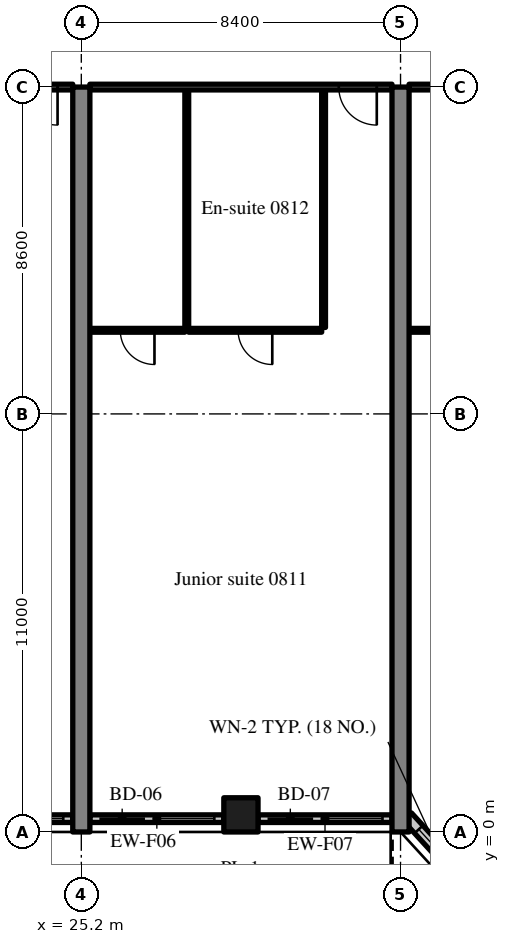
"""IFC4 building model, lengths in metres.
Left out: names, types, materials, properties, quantities, classifications, styles, units other than length and angle.
Written with IfcOpenShell. Run it as: python <this file> out.ifc"""

import sys

from ifc_helpers import new_model, si_unit, direction, frame, frame_2d, origin, origin_2d, place, context, subcontext, project, spatial, rectangle, extrude, source, transform, mapped, element, fill, save


model = new_model("IFC4")
c1 = context("Model", 3, precision=1e-05, world=origin(), true_north=direction((0.0, 1.0)))
c2 = subcontext(c1, "Body", "Model", "MODEL_VIEW")
j1 = project(units=[si_unit("LENGTHUNIT", "METRE"), si_unit("PLANEANGLEUNIT", "RADIAN")], contexts=[c1])
p1 = place(None, origin())
s1 = spatial("IfcSite", under=j1, at=p1, CompositionType="ELEMENT")
p2 = place(p1, origin())
s2 = spatial("IfcBuilding", under=s1, at=p2, CompositionType="ELEMENT")
p3 = place(p2, frame((0.0, 0.0, 39.2)))
s3 = spatial("IfcBuildingStorey", under=s2, at=p3, CompositionType="ELEMENT", Elevation=39.2)
m1 = source(origin(), c2, "Body", "SweptSolid", [
    extrude(rectangle(XDim=19.6, YDim=0.45, at=frame_2d((9.8, 0.0))), origin(), (0.0, 0.0, 1.0), 3.52),
])
for number, where, z_axis, x_axis in (
    (1, (25.2, 0.0, 0.0), (0.0, 0.0, 1.0), (0.0, 1.0, 0.0)),
    (2, (33.6, 0.0, 0.0), (0.0, 0.0, 1.0), (0.0, 1.0, 0.0)),
):
    element("IfcWall", number, at=place(p3, frame(where, z_axis=z_axis, x_axis=x_axis)), inside=s3, PredefinedType="SHEAR", context=c2, shape_type="MappedRepresentation", body=[
        mapped(m1, transform((0.0, 0.0, 0.0), scale=1.0)),
    ])
m2 = source(origin(), c2, "Body", "SweptSolid", [
    extrude(rectangle(XDim=0.9, YDim=0.9, at=origin_2d()), origin(), (0.0, 0.0, 1.0), 3.52),
])
p4 = place(p3, frame((29.4, 0.45, 0.0), z_axis=(0.0, 0.0, 1.0), x_axis=(1.0, 0.0, 0.0)))
e3 = element("IfcColumn", 3, at=p4, inside=s3, PredefinedType="COLUMN", context=c2, shape_type="MappedRepresentation", body=[
    mapped(m2, transform((0.0, 0.0, 0.0), scale=1.0)),
])
m3 = source(origin(), c2, "Body", "SweptSolid", [
    extrude(rectangle(XDim=3.525, YDim=0.2, at=frame_2d((1.763, 0.0))), origin(), (0.0, 0.0, 1.0), 2.77),
])
p5 = place(p3, frame((21.45, 0.35, 0.0), z_axis=(0.0, 0.0, 1.0), x_axis=(1.0, 0.0, 0.0)))
e4 = element("IfcWall", 4, at=p5, inside=s3, PredefinedType="SOLIDWALL", context=c2, shape_type="MappedRepresentation", body=[
    mapped(m3, transform((0.0, 0.0, 0.0), scale=1.0)),
])
m4 = source(origin(), c2, "Body", "SweptSolid", [
    extrude(rectangle(XDim=1.2, YDim=2.4, at=frame_2d((0.6, 1.2))), frame((0.0, 0.11, 0.0), z_axis=(0.0, -1.0, 0.0), x_axis=(1.0, 0.0, 0.0)), (0.0, 0.0, 1.0), 0.22),
])
p6 = place(p5, frame((0.25, 0.0, 0.0)))
e5 = element("IfcOpeningElement", 5, at=p6, cuts=e4, PredefinedType="OPENING", context=c2, shape_type="MappedRepresentation", body=[
    mapped(m4, transform((0.0, 0.0, 0.0), scale=1.0)),
])
m5 = source(origin(), c2, "Body", "SweptSolid", [
    extrude(rectangle(XDim=1.5, YDim=1.5, at=frame_2d((0.75, 0.75))), frame((0.0, 0.11, 0.0), z_axis=(0.0, -1.0, 0.0), x_axis=(1.0, 0.0, 0.0)), (0.0, 0.0, 1.0), 0.22),
])
p7 = place(p5, frame((1.775, 0.0, 0.9)))
e6 = element("IfcOpeningElement", 6, at=p7, cuts=e4, PredefinedType="OPENING", context=c2, shape_type="MappedRepresentation", body=[
    mapped(m5, transform((0.0, 0.0, 0.0), scale=1.0)),
])
m6 = source(origin(), c2, "Body", "SweptSolid", [
    extrude(rectangle(XDim=3.525, YDim=0.2, at=frame_2d((1.762, 0.0))), origin(), (0.0, 0.0, 1.0), 2.77),
])
p8 = place(p3, frame((25.425, 0.35, 0.0), z_axis=(0.0, 0.0, 1.0), x_axis=(1.0, 0.0, 0.0)))
e7 = element("IfcWall", 7, at=p8, inside=s3, PredefinedType="SOLIDWALL", context=c2, shape_type="MappedRepresentation", body=[
    mapped(m6, transform((0.0, 0.0, 0.0), scale=1.0)),
])
p9 = place(p8, frame((0.25, 0.0, 0.0)))
e8 = element("IfcOpeningElement", 8, at=p9, cuts=e7, PredefinedType="OPENING", context=c2, shape_type="MappedRepresentation", body=[
    mapped(m4, transform((0.0, 0.0, 0.0), scale=1.0)),
])
p10 = place(p8, frame((1.775, 0.0, 0.9)))
e9 = element("IfcOpeningElement", 9, at=p10, cuts=e7, PredefinedType="OPENING", context=c2, shape_type="MappedRepresentation", body=[
    mapped(m5, transform((0.0, 0.0, 0.0), scale=1.0)),
])
p11 = place(p3, frame((29.85, 0.35, 0.0), z_axis=(0.0, 0.0, 1.0), x_axis=(1.0, 0.0, 0.0)))
e10 = element("IfcWall", 10, at=p11, inside=s3, PredefinedType="SOLIDWALL", context=c2, shape_type="MappedRepresentation", body=[
    mapped(m6, transform((0.0, 0.0, 0.0), scale=1.0)),
])
p12 = place(p11, frame((0.25, 0.0, 0.0)))
e11 = element("IfcOpeningElement", 11, at=p12, cuts=e10, PredefinedType="OPENING", context=c2, shape_type="MappedRepresentation", body=[
    mapped(m4, transform((0.0, 0.0, 0.0), scale=1.0)),
])
p13 = place(p11, frame((1.775, 0.0, 0.9)))
e12 = element("IfcOpeningElement", 12, at=p13, cuts=e10, PredefinedType="OPENING", context=c2, shape_type="MappedRepresentation", body=[
    mapped(m5, transform((0.0, 0.0, 0.0), scale=1.0)),
])
m7 = source(origin(), c2, "Body", "SweptSolid", [
    extrude(rectangle(XDim=2.398, YDim=0.3, at=frame_2d((1.199, 0.0))), origin(), (0.0, 0.0, 1.0), 3.52),
])
p14 = place(p3, frame((33.776, 0.4, 0.0), z_axis=(0.0, 0.0, 1.0), x_axis=(0.675374189419, -0.737475222815, 0.0)))
e13 = element("IfcWall", 13, at=p14, inside=s3, PredefinedType="SOLIDWALL", context=c2, shape_type="MappedRepresentation", body=[
    mapped(m7, transform((0.0, 0.0, 0.0), scale=1.0)),
])
m8 = source(origin(), c2, "Body", "SweptSolid", [
    extrude(rectangle(XDim=1.5, YDim=2.0, at=frame_2d((0.75, 1.0))), frame((0.0, 0.16, 0.0), z_axis=(0.0, -1.0, 0.0), x_axis=(1.0, 0.0, 0.0)), (0.0, 0.0, 1.0), 0.32),
])
p15 = place(p14, frame((0.449, 0.0, 0.9)))
e14 = element("IfcOpeningElement", 14, at=p15, cuts=e13, PredefinedType="OPENING", context=c2, shape_type="MappedRepresentation", body=[
    mapped(m8, transform((0.0, 0.0, 0.0), scale=1.0)),
])
m9 = source(origin(), c2, "Body", "SweptSolid", [
    extrude(rectangle(XDim=7.95, YDim=0.15, at=frame_2d((3.975, 0.0))), origin(), (0.0, 0.0, 1.0), 2.82),
])
p16 = place(p3, frame((17.025, 19.6, 0.0), z_axis=(0.0, 0.0, 1.0), x_axis=(1.0, 0.0, 0.0)))
e15 = element("IfcWall", 15, at=p16, inside=s3, PredefinedType="PARTITIONING", context=c2, shape_type="MappedRepresentation", body=[
    mapped(m9, transform((0.0, 0.0, 0.0), scale=1.0)),
])
m10 = source(origin(), c2, "Body", "SweptSolid", [
    extrude(rectangle(XDim=1.0, YDim=2.1, at=frame_2d((0.5, 1.05))), frame((0.0, 0.085, 0.0), z_axis=(0.0, -1.0, 0.0), x_axis=(1.0, 0.0, 0.0)), (0.0, 0.0, 1.0), 0.17),
])
p17 = place(p16, frame((6.55, 0.0, 0.0)))
e16 = element("IfcOpeningElement", 16, at=p17, cuts=e15, PredefinedType="OPENING", context=c2, shape_type="MappedRepresentation", body=[
    mapped(m10, transform((0.0, 0.0, 0.0), scale=1.0)),
])
m11 = source(origin(), c2, "Body", "SweptSolid", [
    extrude(rectangle(XDim=6.25, YDim=0.1, at=frame_2d((3.125, 0.0))), origin(), (0.0, 0.0, 1.0), 3.52),
])
for number, where, z_axis, x_axis in (
    (17, (31.575, 13.275, 0.0), (0.0, 0.0, 1.0), (0.0, 1.0, 0.0)),
    (18, (27.975, 13.275, 0.0), (0.0, 0.0, 1.0), (0.0, 1.0, 0.0)),
):
    element("IfcWall", number, at=place(p3, frame(where, z_axis=z_axis, x_axis=x_axis)), inside=s3, PredefinedType="PARTITIONING", context=c2, shape_type="MappedRepresentation", body=[
        mapped(m11, transform((0.0, 0.0, 0.0), scale=1.0)),
    ])
m12 = source(origin(), c2, "Body", "SweptSolid", [
    extrude(rectangle(XDim=3.5, YDim=0.1, at=frame_2d((1.75, 0.0))), origin(), (0.0, 0.0, 1.0), 3.52),
])
p18 = place(p3, frame((28.025, 13.2, 0.0), z_axis=(0.0, 0.0, 1.0), x_axis=(1.0, 0.0, 0.0)))
e19 = element("IfcWall", 19, at=p18, inside=s3, PredefinedType="PARTITIONING", context=c2, shape_type="MappedRepresentation", body=[
    mapped(m12, transform((0.0, 0.0, 0.0), scale=1.0)),
])
m13 = source(origin(), c2, "Body", "SweptSolid", [
    extrude(rectangle(XDim=0.9, YDim=2.1, at=frame_2d((0.45, 1.05))), frame((0.0, 0.06, 0.0), z_axis=(0.0, -1.0, 0.0), x_axis=(1.0, 0.0, 0.0)), (0.0, 0.0, 1.0), 0.12),
])
p19 = place(p18, frame((1.3, 0.0, 0.0)))
e20 = element("IfcOpeningElement", 20, at=p19, cuts=e19, PredefinedType="OPENING", context=c2, shape_type="MappedRepresentation", body=[
    mapped(m13, transform((0.0, 0.0, 0.0), scale=1.0)),
])
m14 = source(origin(), c2, "Body", "SweptSolid", [
    extrude(rectangle(XDim=2.5, YDim=0.1, at=frame_2d((1.25, 0.0))), origin(), (0.0, 0.0, 1.0), 3.52),
])
p20 = place(p3, frame((25.425, 13.2, 0.0), z_axis=(0.0, 0.0, 1.0), x_axis=(1.0, 0.0, 0.0)))
e21 = element("IfcWall", 21, at=p20, inside=s3, PredefinedType="PARTITIONING", context=c2, shape_type="MappedRepresentation", body=[
    mapped(m14, transform((0.0, 0.0, 0.0), scale=1.0)),
])
p21 = place(p20, frame((0.8, 0.0, 0.0)))
e22 = element("IfcOpeningElement", 22, at=p21, cuts=e21, PredefinedType="OPENING", context=c2, shape_type="MappedRepresentation", body=[
    mapped(m13, transform((0.0, 0.0, 0.0), scale=1.0)),
])
m15 = source(origin(), c2, "Body", "SweptSolid", [
    extrude(rectangle(XDim=7.95, YDim=0.15, at=frame_2d((3.975, 0.0))), origin(), (0.0, 0.0, 1.0), 2.82),
])
p22 = place(p3, frame((25.425, 19.6, 0.0), z_axis=(0.0, 0.0, 1.0), x_axis=(1.0, 0.0, 0.0)))
e23 = element("IfcWall", 23, at=p22, inside=s3, PredefinedType="PARTITIONING", context=c2, shape_type="MappedRepresentation", body=[
    mapped(m15, transform((0.0, 0.0, 0.0), scale=1.0)),
])
p23 = place(p22, frame((6.55, 0.0, 0.0)))
e24 = element("IfcOpeningElement", 24, at=p23, cuts=e23, PredefinedType="OPENING", context=c2, shape_type="MappedRepresentation", body=[
    mapped(m10, transform((0.0, 0.0, 0.0), scale=1.0)),
])
p24 = place(p3, frame((33.825, 13.2, 0.0), z_axis=(0.0, 0.0, 1.0), x_axis=(1.0, 0.0, 0.0)))
e25 = element("IfcWall", 25, at=p24, inside=s3, PredefinedType="PARTITIONING", context=c2, shape_type="MappedRepresentation", body=[
    mapped(m14, transform((0.0, 0.0, 0.0), scale=1.0)),
])
p25 = place(p24, frame((0.8, 0.0, 0.0)))
e26 = element("IfcOpeningElement", 26, at=p25, cuts=e25, PredefinedType="OPENING", context=c2, shape_type="MappedRepresentation", body=[
    mapped(m13, transform((0.0, 0.0, 0.0), scale=1.0)),
])
p26 = place(p3, frame((33.825, 19.6, 0.0), z_axis=(0.0, 0.0, 1.0), x_axis=(1.0, 0.0, 0.0)))
e27 = element("IfcWall", 27, at=p26, inside=s3, PredefinedType="PARTITIONING", context=c2, shape_type="MappedRepresentation", body=[
    mapped(m15, transform((0.0, 0.0, 0.0), scale=1.0)),
])
p27 = place(p26, frame((6.55, 0.0, 0.0)))
e28 = element("IfcOpeningElement", 28, at=p27, cuts=e27, PredefinedType="OPENING", context=c2, shape_type="MappedRepresentation", body=[
    mapped(m10, transform((0.0, 0.0, 0.0), scale=1.0)),
])
m16 = source(origin(), c2, "Body", "SweptSolid", [
    extrude(rectangle(XDim=1.5, YDim=1.5, at=frame_2d((0.75, 0.75))), frame((0.0, 0.03, 0.0), z_axis=(0.0, -1.0, 0.0), x_axis=(1.0, 0.0, 0.0)), (0.0, 0.0, 1.0), 0.06),
])
p28 = place(p7, origin())
e29 = element("IfcWindow", 29, at=p28, inside=s3, PartitioningType="SINGLE_PANEL", PredefinedType="WINDOW", context=c2, shape_type="MappedRepresentation", body=[
    mapped(m16, transform((0.0, 0.0, 0.0), scale=1.0)),
])
fill(e6, e29)
m17 = source(origin(), c2, "Body", "SweptSolid", [
    extrude(rectangle(XDim=1.2, YDim=2.4, at=frame_2d((0.6, 1.2))), frame((0.0, 0.025, 0.0), z_axis=(0.0, -1.0, 0.0), x_axis=(1.0, 0.0, 0.0)), (0.0, 0.0, 1.0), 0.05),
])
p29 = place(p9, origin())
e30 = element("IfcDoor", 30, at=p29, inside=s3, OperationType="SLIDING_TO_RIGHT", PredefinedType="DOOR", context=c2, shape_type="MappedRepresentation", body=[
    mapped(m17, transform((0.0, 0.0, 0.0), scale=1.0)),
])
fill(e8, e30)
p30 = place(p10, origin())
e31 = element("IfcWindow", 31, at=p30, inside=s3, PartitioningType="SINGLE_PANEL", PredefinedType="WINDOW", context=c2, shape_type="MappedRepresentation", body=[
    mapped(m16, transform((0.0, 0.0, 0.0), scale=1.0)),
])
fill(e9, e31)
p31 = place(p12, origin())
e32 = element("IfcDoor", 32, at=p31, inside=s3, OperationType="SLIDING_TO_LEFT", PredefinedType="DOOR", context=c2, shape_type="MappedRepresentation", body=[
    mapped(m17, transform((0.0, 0.0, 0.0), scale=1.0)),
])
fill(e11, e32)
p32 = place(p13, origin())
e33 = element("IfcWindow", 33, at=p32, inside=s3, PartitioningType="SINGLE_PANEL", PredefinedType="WINDOW", context=c2, shape_type="MappedRepresentation", body=[
    mapped(m16, transform((0.0, 0.0, 0.0), scale=1.0)),
])
fill(e12, e33)
m18 = source(origin(), c2, "Body", "SweptSolid", [
    extrude(rectangle(XDim=1.5, YDim=2.0, at=frame_2d((0.75, 1.0))), frame((0.0, 0.03, 0.0), z_axis=(0.0, -1.0, 0.0), x_axis=(1.0, 0.0, 0.0)), (0.0, 0.0, 1.0), 0.06),
])
p33 = place(p15, origin())
e34 = element("IfcWindow", 34, at=p33, inside=s3, PartitioningType="SINGLE_PANEL", PredefinedType="WINDOW", context=c2, shape_type="MappedRepresentation", body=[
    mapped(m18, transform((0.0, 0.0, 0.0), scale=1.0)),
])
fill(e14, e34)
m19 = source(origin(), c2, "Body", "SweptSolid", [
    extrude(rectangle(XDim=1.0, YDim=2.1, at=frame_2d((0.5, 1.05))), frame((0.0, 0.025, 0.0), z_axis=(0.0, -1.0, 0.0), x_axis=(1.0, 0.0, 0.0)), (0.0, 0.0, 1.0), 0.05),
])
p34 = place(p17, origin())
e35 = element("IfcDoor", 35, at=p34, inside=s3, OperationType="SINGLE_SWING_RIGHT", PredefinedType="DOOR", context=c2, shape_type="MappedRepresentation", body=[
    mapped(m19, transform((0.0, 0.0, 0.0), scale=1.0)),
])
fill(e16, e35)
m20 = source(origin(), c2, "Body", "SweptSolid", [
    extrude(rectangle(XDim=0.9, YDim=2.1, at=frame_2d((0.45, 1.05))), frame((0.0, 0.025, 0.0), z_axis=(0.0, -1.0, 0.0), x_axis=(1.0, 0.0, 0.0)), (0.0, 0.0, 1.0), 0.05),
])
p35 = place(p19, origin())
e36 = element("IfcDoor", 36, at=p35, inside=s3, OperationType="SINGLE_SWING_RIGHT", PredefinedType="DOOR", context=c2, shape_type="MappedRepresentation", body=[
    mapped(m20, transform((0.0, 0.0, 0.0), scale=1.0)),
])
fill(e20, e36)
p36 = place(p21, origin())
e37 = element("IfcDoor", 37, at=p36, inside=s3, OperationType="SINGLE_SWING_RIGHT", PredefinedType="DOOR", context=c2, shape_type="MappedRepresentation", body=[
    mapped(m20, transform((0.0, 0.0, 0.0), scale=1.0)),
])
fill(e22, e37)
p37 = place(p23, origin())
e38 = element("IfcDoor", 38, at=p37, inside=s3, OperationType="SINGLE_SWING_RIGHT", PredefinedType="DOOR", context=c2, shape_type="MappedRepresentation", body=[
    mapped(m19, transform((0.0, 0.0, 0.0), scale=1.0)),
])
fill(e24, e38)
save(model, sys.argv[1])
